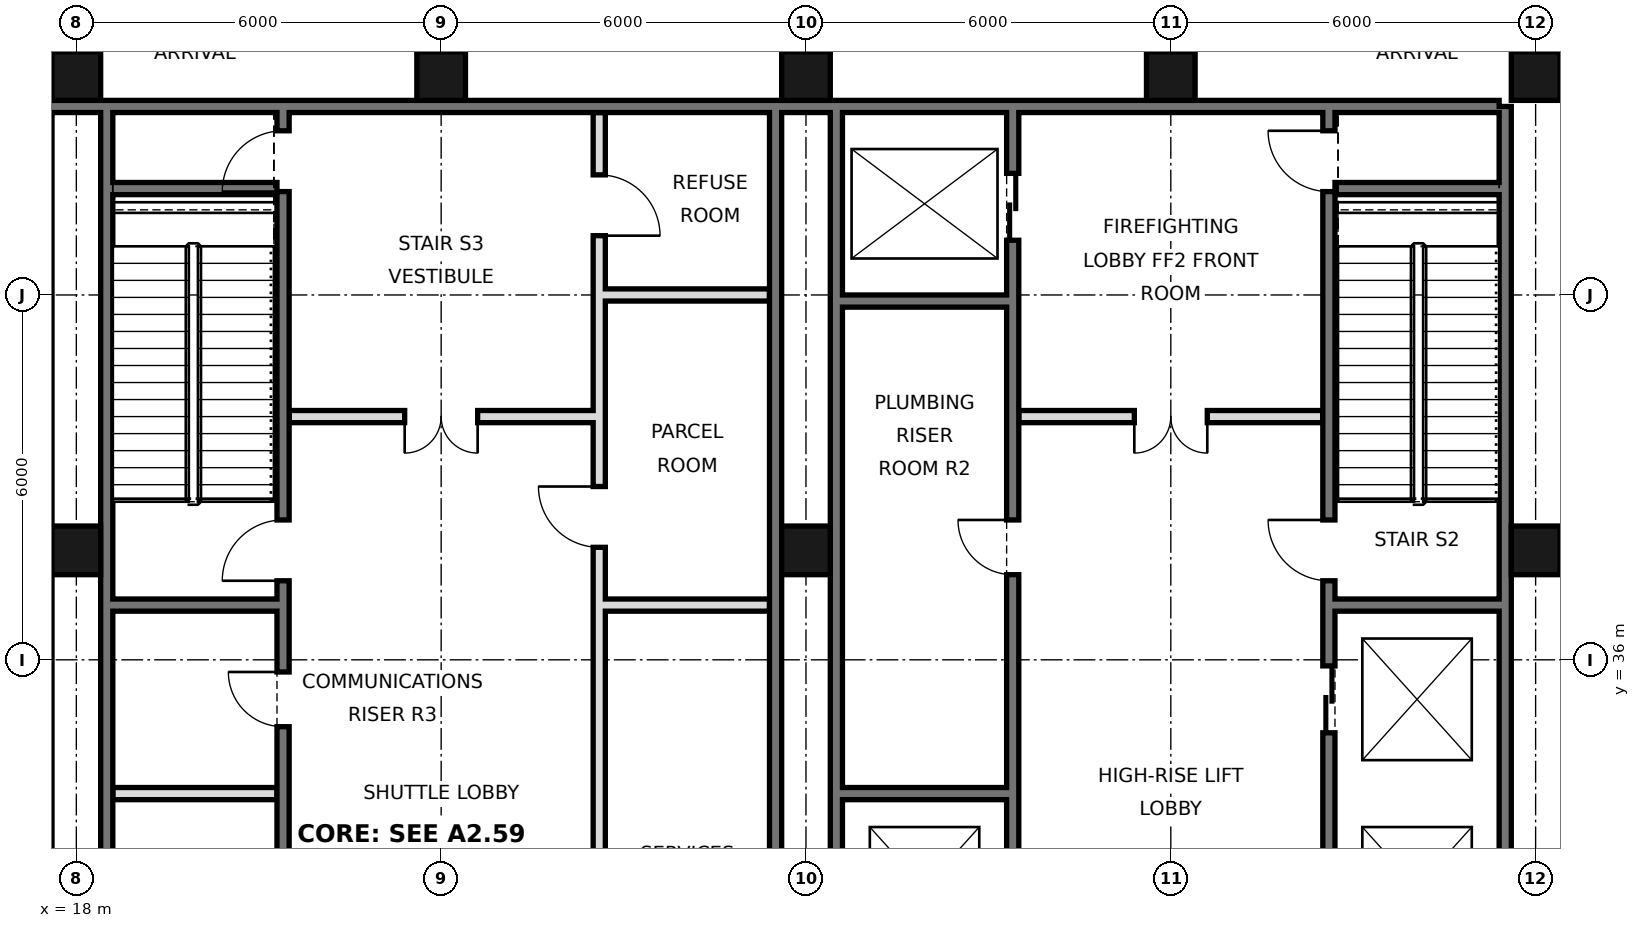
"""IFC4 building model, lengths in metres.
Left out: names, types, materials, properties, quantities, classifications, styles, units other than length and angle.
Written with IfcOpenShell. Run it as: python <this file> out.ifc"""

import sys

from ifc_helpers import new_model, si_unit, direction, frame, frame_2d, origin, origin_2d, place, context, subcontext, project, spatial, rectangle, hollow_rectangle, extrude, element, fill, save


model = new_model("IFC4")
c1 = context("Model", 3, precision=1e-05, world=origin(), true_north=direction((0.0, 1.0)))
c2 = subcontext(c1, "Body", "Model", "MODEL_VIEW")
j1 = project(units=[si_unit("LENGTHUNIT", "METRE"), si_unit("PLANEANGLEUNIT", "RADIAN")], contexts=[c1])
p1 = place(None, origin())
s1 = spatial("IfcSite", under=j1, at=p1, CompositionType="ELEMENT")
p2 = place(p1, origin())
s2 = spatial("IfcBuilding", under=s1, at=p2, CompositionType="ELEMENT")
p3 = place(p2, frame((0.0, 0.0, 234.2)))
s3 = spatial("IfcBuildingStorey", under=s2, at=p3, CompositionType="ELEMENT", Elevation=234.2)
for number, where, z_axis, x_axis in (
    (1, (18.0, 37.8, 0.0), (0.0, 0.0, 1.0), (1.0, 0.0, 0.0)),
    (2, (18.0, 45.6, 0.0), (0.0, 0.0, 1.0), (1.0, 0.0, 0.0)),
    (3, (24.0, 45.6, 0.0), (0.0, 0.0, 1.0), (1.0, 0.0, 0.0)),
    (4, (30.0, 37.8, 0.0), (0.0, 0.0, 1.0), (1.0, 0.0, 0.0)),
    (5, (30.0, 45.6, 0.0), (0.0, 0.0, 1.0), (1.0, 0.0, 0.0)),
    (6, (36.0, 45.6, 0.0), (0.0, 0.0, 1.0), (1.0, 0.0, 0.0)),
    (7, (42.0, 37.8, 0.0), (0.0, 0.0, 1.0), (1.0, 0.0, 0.0)),
    (8, (42.0, 45.6, 0.0), (0.0, 0.0, 1.0), (1.0, 0.0, 0.0)),
):
    element("IfcColumn", number, at=place(p3, frame(where, z_axis=z_axis, x_axis=x_axis)), inside=s3, PredefinedType="COLUMN", context=c2, shape_type="SweptSolid", body=[
        extrude(hollow_rectangle(XDim=0.8, YDim=0.8, WallThickness=0.04, at=origin_2d()), origin(), (0.0, 0.0, 1.0), 5.4),
    ])
p4 = place(p3, frame((41.5, 21.6, 0.0), z_axis=(0.0, 0.0, 1.0), x_axis=(0.0, 1.0, 0.0)))
e9 = element("IfcWall", 9, at=p4, inside=s3, PredefinedType="SOLIDWALL", context=c2, shape_type="SweptSolid", body=[
    extrude(rectangle(XDim=23.5, YDim=0.2, at=frame_2d((11.75, 0.0))), origin(), (0.0, 0.0, 1.0), 5.22),
])
p5 = place(p3, frame((6.6, 45.1, 0.0), z_axis=(0.0, 0.0, 1.0), x_axis=(1.0, 0.0, 0.0)))
e10 = element("IfcWall", 10, at=p5, inside=s3, PredefinedType="SOLIDWALL", context=c2, shape_type="SweptSolid", body=[
    extrude(rectangle(XDim=34.8, YDim=0.2, at=frame_2d((17.4, 0.0))), origin(), (0.0, 0.0, 1.0), 5.22),
])
for number, where, z_axis, x_axis in (
    (11, (18.5, 27.6, 0.0), (0.0, 0.0, 1.0), (0.0, 1.0, 0.0)),
    (12, (29.5, 27.6, 0.0), (0.0, 0.0, 1.0), (0.0, 1.0, 0.0)),
    (13, (30.5, 27.6, 0.0), (0.0, 0.0, 1.0), (0.0, 1.0, 0.0)),
):
    element("IfcWall", number, at=place(p3, frame(where, z_axis=z_axis, x_axis=x_axis)), inside=s3, PredefinedType="SOLIDWALL", context=c2, shape_type="SweptSolid", body=[
        extrude(rectangle(XDim=17.5, YDim=0.2, at=frame_2d((8.75, 0.0))), origin(), (0.0, 0.0, 1.0), 5.22),
    ])
p6 = place(p3, frame((21.4, 27.5, 0.0), z_axis=(0.0, 0.0, 1.0), x_axis=(0.0, 1.0, 0.0)))
e14 = element("IfcWall", 14, at=p6, inside=s3, PredefinedType="SOLIDWALL", context=c2, shape_type="SweptSolid", body=[
    extrude(rectangle(XDim=17.5, YDim=0.2, at=frame_2d((8.75, 0.0))), origin(), (0.0, 0.0, 1.0), 5.22),
])
p7 = place(p6, frame((0.55, 0.0, 0.0)))
e15 = element("IfcOpeningElement", 15, at=p7, cuts=e14, PredefinedType="OPENING", context=c2, shape_type="SweptSolid", body=[
    extrude(rectangle(XDim=1.0, YDim=2.1, at=frame_2d((0.5, 1.05))), frame((0.0, 0.11, 0.0), z_axis=(0.0, -1.0, 0.0), x_axis=(1.0, 0.0, 0.0)), (0.0, 0.0, 1.0), 0.22),
])
p8 = place(p6, frame((3.65, 0.0, 0.0)))
e16 = element("IfcOpeningElement", 16, at=p8, cuts=e14, PredefinedType="OPENING", context=c2, shape_type="SweptSolid", body=[
    extrude(rectangle(XDim=1.0, YDim=2.1, at=frame_2d((0.5, 1.05))), frame((0.0, 0.11, 0.0), z_axis=(0.0, -1.0, 0.0), x_axis=(1.0, 0.0, 0.0)), (0.0, 0.0, 1.0), 0.22),
])
p9 = place(p6, frame((16.2, 0.0, 0.0)))
e17 = element("IfcOpeningElement", 17, at=p9, cuts=e14, PredefinedType="OPENING", context=c2, shape_type="SweptSolid", body=[
    extrude(rectangle(XDim=1.0, YDim=2.1, at=frame_2d((0.5, 1.05))), frame((0.0, 0.11, 0.0), z_axis=(0.0, -1.0, 0.0), x_axis=(1.0, 0.0, 0.0)), (0.0, 0.0, 1.0), 0.22),
])
p10 = place(p6, frame((9.8, 0.0, 0.0)))
e18 = element("IfcOpeningElement", 18, at=p10, cuts=e14, PredefinedType="OPENING", context=c2, shape_type="SweptSolid", body=[
    extrude(rectangle(XDim=1.0, YDim=2.1, at=frame_2d((0.5, 1.05))), frame((0.0, 0.11, 0.0), z_axis=(0.0, -1.0, 0.0), x_axis=(1.0, 0.0, 0.0)), (0.0, 0.0, 1.0), 0.22),
])
p11 = place(p6, frame((7.4, 0.0, 0.0)))
e19 = element("IfcOpeningElement", 19, at=p11, cuts=e14, PredefinedType="OPENING", context=c2, shape_type="SweptSolid", body=[
    extrude(rectangle(XDim=0.9, YDim=2.1, at=frame_2d((0.45, 1.05))), frame((0.0, 0.11, 0.0), z_axis=(0.0, -1.0, 0.0), x_axis=(1.0, 0.0, 0.0)), (0.0, 0.0, 1.0), 0.22),
])
p12 = place(p3, frame((26.6, 27.5, 0.0), z_axis=(0.0, 0.0, 1.0), x_axis=(0.0, 1.0, 0.0)))
e20 = element("IfcWall", 20, at=p12, inside=s3, PredefinedType="SOLIDWALL", context=c2, shape_type="SweptSolid", body=[
    extrude(rectangle(XDim=17.5, YDim=0.2, at=frame_2d((8.75, 0.0))), origin(), (0.0, 0.0, 1.0), 5.22),
])
p13 = place(p12, frame((4.3, 0.0, 0.0)))
e21 = element("IfcOpeningElement", 21, at=p13, cuts=e20, PredefinedType="OPENING", context=c2, shape_type="SweptSolid", body=[
    extrude(rectangle(XDim=0.9, YDim=2.1, at=frame_2d((0.45, 1.05))), frame((0.0, 0.11, 0.0), z_axis=(0.0, -1.0, 0.0), x_axis=(1.0, 0.0, 0.0)), (0.0, 0.0, 1.0), 0.22),
])
p14 = place(p12, frame((10.35, 0.0, 0.0)))
e22 = element("IfcOpeningElement", 22, at=p14, cuts=e20, PredefinedType="OPENING", context=c2, shape_type="SweptSolid", body=[
    extrude(rectangle(XDim=1.0, YDim=2.1, at=frame_2d((0.5, 1.05))), frame((0.0, 0.11, 0.0), z_axis=(0.0, -1.0, 0.0), x_axis=(1.0, 0.0, 0.0)), (0.0, 0.0, 1.0), 0.22),
])
p15 = place(p12, frame((15.475, 0.0, 0.0)))
e23 = element("IfcOpeningElement", 23, at=p15, cuts=e20, PredefinedType="OPENING", context=c2, shape_type="SweptSolid", body=[
    extrude(rectangle(XDim=1.0, YDim=2.1, at=frame_2d((0.5, 1.05))), frame((0.0, 0.11, 0.0), z_axis=(0.0, -1.0, 0.0), x_axis=(1.0, 0.0, 0.0)), (0.0, 0.0, 1.0), 0.22),
])
p16 = place(p3, frame((33.4, 27.5, 0.0), z_axis=(0.0, 0.0, 1.0), x_axis=(0.0, 1.0, 0.0)))
e24 = element("IfcWall", 24, at=p16, inside=s3, PredefinedType="SOLIDWALL", context=c2, shape_type="SweptSolid", body=[
    extrude(rectangle(XDim=17.5, YDim=0.2, at=frame_2d((8.75, 0.0))), origin(), (0.0, 0.0, 1.0), 5.22),
])
p17 = place(p16, frame((1.1, 0.0, 0.0)))
e25 = element("IfcOpeningElement", 25, at=p17, cuts=e24, PredefinedType="OPENING", context=c2, shape_type="SweptSolid", body=[
    extrude(rectangle(XDim=1.1, YDim=2.1, at=frame_2d((0.55, 1.05))), frame((0.0, 0.11, 0.0), z_axis=(0.0, -1.0, 0.0), x_axis=(1.0, 0.0, 0.0)), (0.0, 0.0, 1.0), 0.22),
])
p18 = place(p16, frame((4.2, 0.0, 0.0)))
e26 = element("IfcOpeningElement", 26, at=p18, cuts=e24, PredefinedType="OPENING", context=c2, shape_type="SweptSolid", body=[
    extrude(rectangle(XDim=1.1, YDim=2.1, at=frame_2d((0.55, 1.05))), frame((0.0, 0.11, 0.0), z_axis=(0.0, -1.0, 0.0), x_axis=(1.0, 0.0, 0.0)), (0.0, 0.0, 1.0), 0.22),
])
p19 = place(p16, frame((15.4, 0.0, 0.0)))
e27 = element("IfcOpeningElement", 27, at=p19, cuts=e24, PredefinedType="OPENING", context=c2, shape_type="SweptSolid", body=[
    extrude(rectangle(XDim=1.1, YDim=2.1, at=frame_2d((0.55, 1.05))), frame((0.0, 0.11, 0.0), z_axis=(0.0, -1.0, 0.0), x_axis=(1.0, 0.0, 0.0)), (0.0, 0.0, 1.0), 0.22),
])
p20 = place(p16, frame((9.9, 0.0, 0.0)))
e28 = element("IfcOpeningElement", 28, at=p20, cuts=e24, PredefinedType="OPENING", context=c2, shape_type="SweptSolid", body=[
    extrude(rectangle(XDim=0.9, YDim=2.1, at=frame_2d((0.45, 1.05))), frame((0.0, 0.11, 0.0), z_axis=(0.0, -1.0, 0.0), x_axis=(1.0, 0.0, 0.0)), (0.0, 0.0, 1.0), 0.22),
])
p21 = place(p3, frame((38.6, 21.6, 0.0), z_axis=(0.0, 0.0, 1.0), x_axis=(0.0, 1.0, 0.0)))
e29 = element("IfcWall", 29, at=p21, inside=s3, PredefinedType="SOLIDWALL", context=c2, shape_type="SweptSolid", body=[
    extrude(rectangle(XDim=23.4, YDim=0.2, at=frame_2d((11.7, 0.0))), origin(), (0.0, 0.0, 1.0), 5.22),
])
p22 = place(p21, frame((7.0, 0.0, 0.0)))
e30 = element("IfcOpeningElement", 30, at=p22, cuts=e29, PredefinedType="OPENING", context=c2, shape_type="SweptSolid", body=[
    extrude(rectangle(XDim=1.1, YDim=2.1, at=frame_2d((0.55, 1.05))), frame((0.0, 0.11, 0.0), z_axis=(0.0, -1.0, 0.0), x_axis=(1.0, 0.0, 0.0)), (0.0, 0.0, 1.0), 0.22),
])
p23 = place(p21, frame((10.1, 0.0, 0.0)))
e31 = element("IfcOpeningElement", 31, at=p23, cuts=e29, PredefinedType="OPENING", context=c2, shape_type="SweptSolid", body=[
    extrude(rectangle(XDim=1.1, YDim=2.1, at=frame_2d((0.55, 1.05))), frame((0.0, 0.11, 0.0), z_axis=(0.0, -1.0, 0.0), x_axis=(1.0, 0.0, 0.0)), (0.0, 0.0, 1.0), 0.22),
])
p24 = place(p21, frame((13.2, 0.0, 0.0)))
e32 = element("IfcOpeningElement", 32, at=p24, cuts=e29, PredefinedType="OPENING", context=c2, shape_type="SweptSolid", body=[
    extrude(rectangle(XDim=1.1, YDim=2.1, at=frame_2d((0.55, 1.05))), frame((0.0, 0.11, 0.0), z_axis=(0.0, -1.0, 0.0), x_axis=(1.0, 0.0, 0.0)), (0.0, 0.0, 1.0), 0.22),
])
p25 = place(p21, frame((22.1, 0.0, 0.0)))
e33 = element("IfcOpeningElement", 33, at=p25, cuts=e29, PredefinedType="OPENING", context=c2, shape_type="SweptSolid", body=[
    extrude(rectangle(XDim=1.0, YDim=2.1, at=frame_2d((0.5, 1.05))), frame((0.0, 0.11, 0.0), z_axis=(0.0, -1.0, 0.0), x_axis=(1.0, 0.0, 0.0)), (0.0, 0.0, 1.0), 0.22),
])
p26 = place(p21, frame((15.7, 0.0, 0.0)))
e34 = element("IfcOpeningElement", 34, at=p26, cuts=e29, PredefinedType="OPENING", context=c2, shape_type="SweptSolid", body=[
    extrude(rectangle(XDim=1.0, YDim=2.1, at=frame_2d((0.5, 1.05))), frame((0.0, 0.11, 0.0), z_axis=(0.0, -1.0, 0.0), x_axis=(1.0, 0.0, 0.0)), (0.0, 0.0, 1.0), 0.22),
])
p27 = place(p21, frame((0.175, 0.0, 0.0)))
e35 = element("IfcOpeningElement", 35, at=p27, cuts=e29, PredefinedType="OPENING", context=c2, shape_type="SweptSolid", body=[
    extrude(rectangle(XDim=0.9, YDim=2.1, at=frame_2d((0.45, 1.05))), frame((0.0, 0.11, 0.0), z_axis=(0.0, -1.0, 0.0), x_axis=(1.0, 0.0, 0.0)), (0.0, 0.0, 1.0), 0.22),
])
for number, where, z_axis, x_axis in (
    (36, (18.6, 33.8, 0.0), (0.0, 0.0, 1.0), (1.0, 0.0, 0.0)),
    (37, (30.6, 33.8, 0.0), (0.0, 0.0, 1.0), (1.0, 0.0, 0.0)),
    (38, (18.6, 36.9, 0.0), (0.0, 0.0, 1.0), (1.0, 0.0, 0.0)),
    (39, (26.7, 36.9, 0.0), (0.0, 0.0, 1.0), (1.0, 0.0, 0.0)),
    (40, (38.7, 36.9, 0.0), (0.0, 0.0, 1.0), (1.0, 0.0, 0.0)),
):
    element("IfcWall", number, at=place(p3, frame(where, z_axis=z_axis, x_axis=x_axis)), inside=s3, PredefinedType="SOLIDWALL", context=c2, shape_type="SweptSolid", body=[
        extrude(rectangle(XDim=2.7, YDim=0.2, at=frame_2d((1.35, 0.0))), origin(), (0.0, 0.0, 1.0), 5.22),
    ])
p28 = place(p3, frame((21.5, 40.0, 0.0), z_axis=(0.0, 0.0, 1.0), x_axis=(1.0, 0.0, 0.0)))
e41 = element("IfcWall", 41, at=p28, inside=s3, PredefinedType="PARTITIONING", context=c2, shape_type="SweptSolid", body=[
    extrude(rectangle(XDim=5.0, YDim=0.2, at=frame_2d((2.5, 0.0))), origin(), (0.0, 0.0, 1.0), 5.22),
])
p29 = place(p28, frame((1.9, 0.0, 0.0)))
e42 = element("IfcOpeningElement", 42, at=p29, cuts=e41, PredefinedType="OPENING", context=c2, shape_type="SweptSolid", body=[
    extrude(rectangle(XDim=1.2, YDim=2.1, at=frame_2d((0.6, 1.05))), frame((0.0, 0.11, 0.0), z_axis=(0.0, -1.0, 0.0), x_axis=(1.0, 0.0, 0.0)), (0.0, 0.0, 1.0), 0.22),
])
p30 = place(p3, frame((33.5, 40.0, 0.0), z_axis=(0.0, 0.0, 1.0), x_axis=(1.0, 0.0, 0.0)))
e43 = element("IfcWall", 43, at=p30, inside=s3, PredefinedType="PARTITIONING", context=c2, shape_type="SweptSolid", body=[
    extrude(rectangle(XDim=5.0, YDim=0.2, at=frame_2d((2.5, 0.0))), origin(), (0.0, 0.0, 1.0), 5.22),
])
p31 = place(p30, frame((1.9, 0.0, 0.0)))
e44 = element("IfcOpeningElement", 44, at=p31, cuts=e43, PredefinedType="OPENING", context=c2, shape_type="SweptSolid", body=[
    extrude(rectangle(XDim=1.2, YDim=2.1, at=frame_2d((0.6, 1.05))), frame((0.0, 0.11, 0.0), z_axis=(0.0, -1.0, 0.0), x_axis=(1.0, 0.0, 0.0)), (0.0, 0.0, 1.0), 0.22),
])
p32 = place(p3, frame((30.6, 41.9, 0.0), z_axis=(0.0, 0.0, 1.0), x_axis=(1.0, 0.0, 0.0)))
e45 = element("IfcWall", 45, at=p32, inside=s3, PredefinedType="SOLIDWALL", context=c2, shape_type="SweptSolid", body=[
    extrude(rectangle(XDim=2.7, YDim=0.2, at=frame_2d((1.35, 0.0))), origin(), (0.0, 0.0, 1.0), 5.22),
])
p33 = place(p3, frame((26.7, 42.0, 0.0), z_axis=(0.0, 0.0, 1.0), x_axis=(1.0, 0.0, 0.0)))
e46 = element("IfcWall", 46, at=p33, inside=s3, PredefinedType="PARTITIONING", context=c2, shape_type="SweptSolid", body=[
    extrude(rectangle(XDim=2.7, YDim=0.2, at=frame_2d((1.35, 0.0))), origin(), (0.0, 0.0, 1.0), 5.22),
])
for number, where, z_axis, x_axis in (
    (47, (18.6, 43.75, 0.0), (0.0, 0.0, 1.0), (1.0, 0.0, 0.0)),
    (48, (38.7, 43.75, 0.0), (0.0, 0.0, 1.0), (1.0, 0.0, 0.0)),
):
    element("IfcWall", number, at=place(p3, frame(where, z_axis=z_axis, x_axis=x_axis)), inside=s3, PredefinedType="SOLIDWALL", context=c2, shape_type="SweptSolid", body=[
        extrude(rectangle(XDim=2.7, YDim=0.2, at=frame_2d((1.35, 0.0))), origin(), (0.0, 0.0, 1.0), 2.5),
    ])
p34 = place(p29, frame((1.2, 0.0, 0.0), z_axis=(0.0, 0.0, 1.0), x_axis=(-1.0, 0.0, 0.0)))
e49 = element("IfcDoor", 49, at=p34, inside=s3, OperationType="DOUBLE_DOOR_SINGLE_SWING", PredefinedType="DOOR", context=c2, shape_type="SweptSolid", body=[
    extrude(rectangle(XDim=1.2, YDim=2.1, at=frame_2d((0.6, 1.05))), frame((0.0, 0.025, 0.0), z_axis=(0.0, -1.0, 0.0), x_axis=(1.0, 0.0, 0.0)), (0.0, 0.0, 1.0), 0.05),
])
fill(e42, e49)
p35 = place(p31, frame((1.2, 0.0, 0.0), z_axis=(0.0, 0.0, 1.0), x_axis=(-1.0, 0.0, 0.0)))
e50 = element("IfcDoor", 50, at=p35, inside=s3, OperationType="DOUBLE_DOOR_SINGLE_SWING", PredefinedType="DOOR", context=c2, shape_type="SweptSolid", body=[
    extrude(rectangle(XDim=1.2, YDim=2.1, at=frame_2d((0.6, 1.05))), frame((0.0, 0.025, 0.0), z_axis=(0.0, -1.0, 0.0), x_axis=(1.0, 0.0, 0.0)), (0.0, 0.0, 1.0), 0.05),
])
fill(e44, e50)
p36 = place(p24, origin())
e51 = element("IfcDoor", 51, at=p36, inside=s3, OperationType="DOUBLE_DOOR_SLIDING", PredefinedType="DOOR", context=c2, shape_type="SweptSolid", body=[
    extrude(rectangle(XDim=1.1, YDim=2.1, at=frame_2d((0.55, 1.05))), frame((0.0, 0.025, 0.0), z_axis=(0.0, -1.0, 0.0), x_axis=(1.0, 0.0, 0.0)), (0.0, 0.0, 1.0), 0.05),
])
fill(e32, e51)
p37 = place(p19, origin())
e52 = element("IfcDoor", 52, at=p37, inside=s3, OperationType="DOUBLE_DOOR_SLIDING", PredefinedType="DOOR", context=c2, shape_type="SweptSolid", body=[
    extrude(rectangle(XDim=1.1, YDim=2.1, at=frame_2d((0.55, 1.05))), frame((0.0, 0.025, 0.0), z_axis=(0.0, -1.0, 0.0), x_axis=(1.0, 0.0, 0.0)), (0.0, 0.0, 1.0), 0.05),
])
fill(e27, e52)
p38 = place(p25, frame((1.0, 0.0, 0.0), z_axis=(0.0, 0.0, 1.0), x_axis=(-1.0, 0.0, 0.0)))
e53 = element("IfcDoor", 53, at=p38, inside=s3, OperationType="SINGLE_SWING_LEFT", PredefinedType="DOOR", context=c2, shape_type="SweptSolid", body=[
    extrude(rectangle(XDim=1.0, YDim=2.1, at=frame_2d((0.5, 1.05))), frame((0.0, 0.025, 0.0), z_axis=(0.0, -1.0, 0.0), x_axis=(1.0, 0.0, 0.0)), (0.0, 0.0, 1.0), 0.05),
])
fill(e33, e53)
p39 = place(p26, frame((1.0, 0.0, 0.0), z_axis=(0.0, 0.0, 1.0), x_axis=(-1.0, 0.0, 0.0)))
e54 = element("IfcDoor", 54, at=p39, inside=s3, OperationType="SINGLE_SWING_LEFT", PredefinedType="DOOR", context=c2, shape_type="SweptSolid", body=[
    extrude(rectangle(XDim=1.0, YDim=2.1, at=frame_2d((0.5, 1.05))), frame((0.0, 0.025, 0.0), z_axis=(0.0, -1.0, 0.0), x_axis=(1.0, 0.0, 0.0)), (0.0, 0.0, 1.0), 0.05),
])
fill(e34, e54)
p40 = place(p9, origin())
e55 = element("IfcDoor", 55, at=p40, inside=s3, OperationType="SINGLE_SWING_LEFT", PredefinedType="DOOR", context=c2, shape_type="SweptSolid", body=[
    extrude(rectangle(XDim=1.0, YDim=2.1, at=frame_2d((0.5, 1.05))), frame((0.0, 0.025, 0.0), z_axis=(0.0, -1.0, 0.0), x_axis=(1.0, 0.0, 0.0)), (0.0, 0.0, 1.0), 0.05),
])
fill(e17, e55)
p41 = place(p10, origin())
e56 = element("IfcDoor", 56, at=p41, inside=s3, OperationType="SINGLE_SWING_LEFT", PredefinedType="DOOR", context=c2, shape_type="SweptSolid", body=[
    extrude(rectangle(XDim=1.0, YDim=2.1, at=frame_2d((0.5, 1.05))), frame((0.0, 0.025, 0.0), z_axis=(0.0, -1.0, 0.0), x_axis=(1.0, 0.0, 0.0)), (0.0, 0.0, 1.0), 0.05),
])
fill(e18, e56)
p42 = place(p20, frame((0.9, 0.0, 0.0), z_axis=(0.0, 0.0, 1.0), x_axis=(-1.0, 0.0, 0.0)))
e57 = element("IfcDoor", 57, at=p42, inside=s3, OperationType="SINGLE_SWING_LEFT", PredefinedType="DOOR", context=c2, shape_type="SweptSolid", body=[
    extrude(rectangle(XDim=0.9, YDim=2.1, at=frame_2d((0.45, 1.05))), frame((0.0, 0.025, 0.0), z_axis=(0.0, -1.0, 0.0), x_axis=(1.0, 0.0, 0.0)), (0.0, 0.0, 1.0), 0.05),
])
fill(e28, e57)
p43 = place(p11, frame((0.9, 0.0, 0.0), z_axis=(0.0, 0.0, 1.0), x_axis=(-1.0, 0.0, 0.0)))
e58 = element("IfcDoor", 58, at=p43, inside=s3, OperationType="SINGLE_SWING_LEFT", PredefinedType="DOOR", context=c2, shape_type="SweptSolid", body=[
    extrude(rectangle(XDim=0.9, YDim=2.1, at=frame_2d((0.45, 1.05))), frame((0.0, 0.025, 0.0), z_axis=(0.0, -1.0, 0.0), x_axis=(1.0, 0.0, 0.0)), (0.0, 0.0, 1.0), 0.05),
])
fill(e19, e58)
p44 = place(p14, frame((1.0, 0.0, 0.0), z_axis=(0.0, 0.0, 1.0), x_axis=(-1.0, 0.0, 0.0)))
e59 = element("IfcDoor", 59, at=p44, inside=s3, OperationType="SINGLE_SWING_LEFT", PredefinedType="DOOR", context=c2, shape_type="SweptSolid", body=[
    extrude(rectangle(XDim=1.0, YDim=2.1, at=frame_2d((0.5, 1.05))), frame((0.0, 0.025, 0.0), z_axis=(0.0, -1.0, 0.0), x_axis=(1.0, 0.0, 0.0)), (0.0, 0.0, 1.0), 0.05),
])
fill(e22, e59)
p45 = place(p15, frame((1.0, 0.0, 0.0), z_axis=(0.0, 0.0, 1.0), x_axis=(-1.0, 0.0, 0.0)))
e60 = element("IfcDoor", 60, at=p45, inside=s3, OperationType="SINGLE_SWING_RIGHT", PredefinedType="DOOR", context=c2, shape_type="SweptSolid", body=[
    extrude(rectangle(XDim=1.0, YDim=2.1, at=frame_2d((0.5, 1.05))), frame((0.0, 0.025, 0.0), z_axis=(0.0, -1.0, 0.0), x_axis=(1.0, 0.0, 0.0)), (0.0, 0.0, 1.0), 0.05),
])
fill(e23, e60)
save(model, sys.argv[1])
